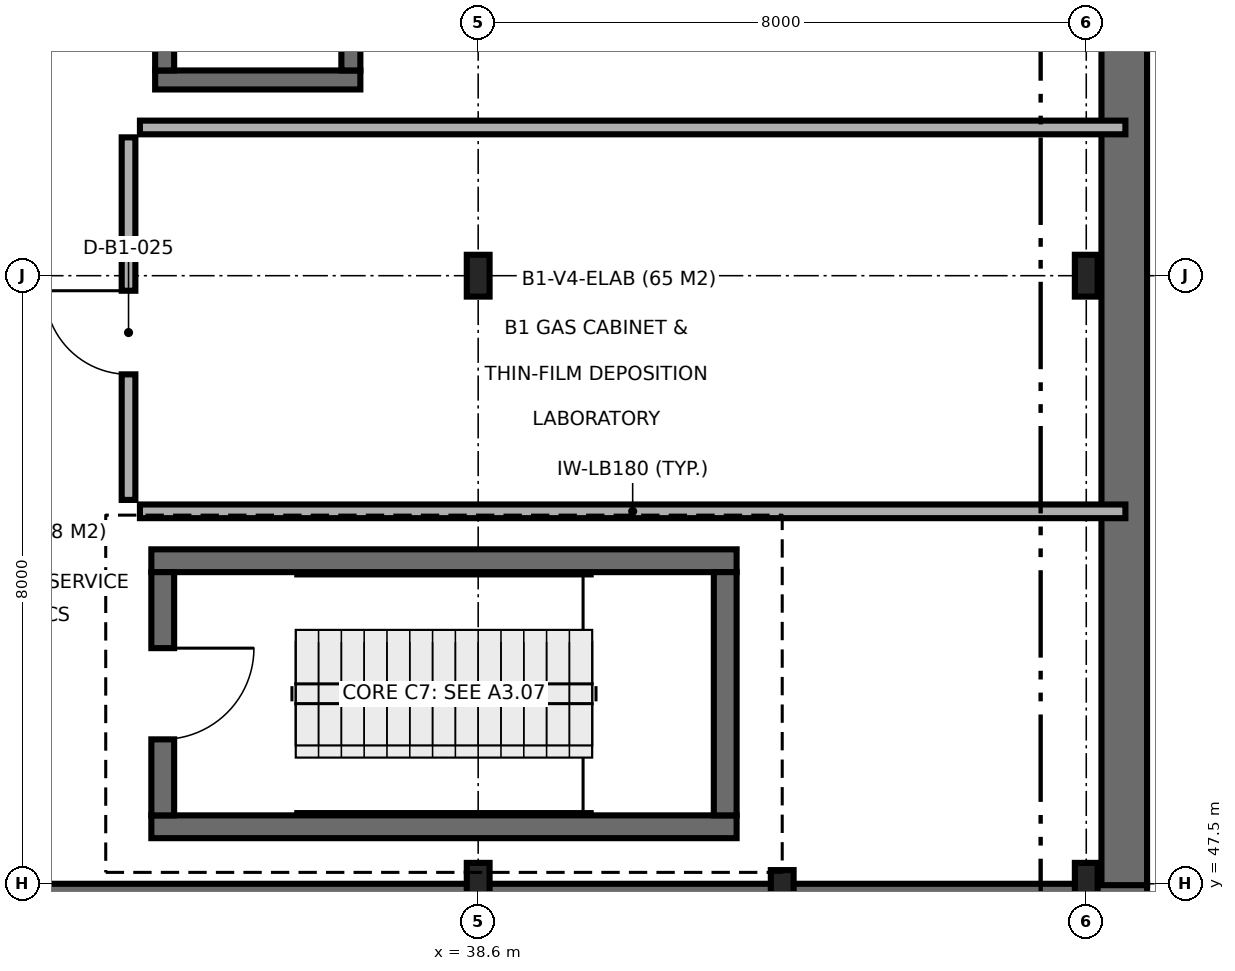
"""IFC4 building model, lengths in metres.
Left out: names, types, materials, properties, quantities, classifications, styles, units other than length and angle.
Written with IfcOpenShell. Run it as: python <this file> out.ifc"""

import sys

from ifc_helpers import new_model, si_unit, direction, frame, frame_2d, origin, origin_2d, place, context, subcontext, project, spatial, rectangle, i_section, extrude, element, fill, save


model = new_model("IFC4")
c1 = context("Model", 3, precision=1e-05, world=origin(), true_north=direction((0.0, 1.0)))
c2 = subcontext(c1, "Body", "Model", "MODEL_VIEW")
j1 = project(units=[si_unit("LENGTHUNIT", "METRE"), si_unit("PLANEANGLEUNIT", "RADIAN")], contexts=[c1])
p1 = place(None, origin())
s1 = spatial("IfcSite", under=j1, at=p1, CompositionType="ELEMENT")
p2 = place(p1, origin())
s2 = spatial("IfcBuilding", under=s1, at=p2, CompositionType="ELEMENT")
p3 = place(p2, frame((0.0, 0.0, -5.0)))
s3 = spatial("IfcBuildingStorey", under=s2, at=p3, CompositionType="ELEMENT", Elevation=-5.0)
for number, where, z_axis, x_axis in (
    (1, (38.6, 47.5, 0.0), (0.0, 0.0, 1.0), (1.0, 0.0, 0.0)),
    (2, (38.6, 55.5, 0.0), (0.0, 0.0, 1.0), (1.0, 0.0, 0.0)),
):
    element("IfcColumn", number, at=place(p3, frame(where, z_axis=z_axis, x_axis=x_axis)), inside=s3, PredefinedType="COLUMN", context=c2, shape_type="SweptSolid", body=[
        extrude(i_section(OverallWidth=0.3, OverallDepth=0.55, WebThickness=0.015, FlangeThickness=0.029, FilletRadius=0.027, at=origin_2d()), origin(), (0.0, 0.0, 1.0), 5.0),
    ])
p4 = place(p3, frame((42.6, 47.5, 0.0), z_axis=(0.0, 0.0, 1.0), x_axis=(1.0, 0.0, 0.0)))
e3 = element("IfcColumn", 3, at=p4, inside=s3, PredefinedType="COLUMN", context=c2, shape_type="SweptSolid", body=[
    extrude(i_section(OverallWidth=0.3, OverallDepth=0.36, WebThickness=0.012, FlangeThickness=0.022, FilletRadius=0.027, at=origin_2d()), origin(), (0.0, 0.0, 1.0), 5.0),
])
for number, where, z_axis, x_axis in (
    (4, (46.6, 47.5, 0.0), (0.0, 0.0, 1.0), (1.0, 0.0, 0.0)),
    (5, (46.6, 55.5, 0.0), (0.0, 0.0, 1.0), (1.0, 0.0, 0.0)),
):
    element("IfcColumn", number, at=place(p3, frame(where, z_axis=z_axis, x_axis=x_axis)), inside=s3, PredefinedType="COLUMN", context=c2, shape_type="SweptSolid", body=[
        extrude(i_section(OverallWidth=0.3, OverallDepth=0.55, WebThickness=0.015, FlangeThickness=0.029, FilletRadius=0.027, at=origin_2d()), origin(), (0.0, 0.0, 1.0), 5.0),
    ])
for number, where, z_axis, x_axis in (
    (6, (34.3, 48.25, 0.0), (0.0, 0.0, 1.0), (1.0, 0.0, 0.0)),
    (7, (42.0, 51.75, 0.0), (0.0, 0.0, 1.0), (-1.0, 0.0, 0.0)),
):
    element("IfcWall", number, at=place(p3, frame(where, z_axis=z_axis, x_axis=x_axis)), inside=s3, PredefinedType="SHEAR", context=c2, shape_type="SweptSolid", body=[
        extrude(rectangle(XDim=7.7, YDim=0.3, at=frame_2d((3.85, 0.0))), origin(), (0.0, 0.0, 1.0), 5.0),
    ])
p5 = place(p3, frame((34.45, 51.6, 0.0), z_axis=(0.0, 0.0, 1.0), x_axis=(0.0, -1.0, 0.0)))
e8 = element("IfcWall", 8, at=p5, inside=s3, PredefinedType="SHEAR", context=c2, shape_type="SweptSolid", body=[
    extrude(rectangle(XDim=3.2, YDim=0.3, at=frame_2d((1.6, 0.0))), origin(), (0.0, 0.0, 1.0), 5.0),
])
p6 = place(p5, frame((1.0, 0.0, 0.0)))
e9 = element("IfcOpeningElement", 9, at=p6, cuts=e8, PredefinedType="OPENING", context=c2, shape_type="SweptSolid", body=[
    extrude(rectangle(XDim=1.2, YDim=2.15, at=frame_2d((0.6, 1.075))), frame((0.0, 0.16, 0.0), z_axis=(0.0, -1.0, 0.0), x_axis=(1.0, 0.0, 0.0)), (0.0, 0.0, 1.0), 0.32),
])
p7 = place(p3, frame((41.85, 48.4, 0.0), z_axis=(0.0, 0.0, 1.0), x_axis=(0.0, 1.0, 0.0)))
e10 = element("IfcWall", 10, at=p7, inside=s3, PredefinedType="SHEAR", context=c2, shape_type="SweptSolid", body=[
    extrude(rectangle(XDim=3.2, YDim=0.3, at=frame_2d((1.6, 0.0))), origin(), (0.0, 0.0, 1.0), 5.0),
])
p8 = place(p3, frame((34.35, 58.075, 0.0), z_axis=(0.0, 0.0, 1.0), x_axis=(1.0, 0.0, 0.0)))
e11 = element("IfcWall", 11, at=p8, inside=s3, PredefinedType="SHEAR", context=c2, shape_type="SweptSolid", body=[
    extrude(rectangle(XDim=2.7, YDim=0.25, at=frame_2d((1.35, 0.0))), origin(), (0.0, 0.0, 1.0), 5.0),
])
p9 = place(p3, frame((34.475, 61.0, 0.0), z_axis=(0.0, 0.0, 1.0), x_axis=(0.0, -1.0, 0.0)))
e12 = element("IfcWall", 12, at=p9, inside=s3, PredefinedType="SHEAR", context=c2, shape_type="SweptSolid", body=[
    extrude(rectangle(XDim=2.8, YDim=0.25, at=frame_2d((1.4, 0.0))), origin(), (0.0, 0.0, 1.0), 5.0),
])
p10 = place(p9, frame((0.85, 0.0, 0.0)))
e13 = element("IfcOpeningElement", 13, at=p10, cuts=e12, PredefinedType="OPENING", context=c2, shape_type="SweptSolid", body=[
    extrude(rectangle(XDim=1.1, YDim=2.15, at=frame_2d((0.55, 1.075))), frame((0.0, 0.135, 0.0), z_axis=(0.0, -1.0, 0.0), x_axis=(1.0, 0.0, 0.0)), (0.0, 0.0, 1.0), 0.27),
])
p11 = place(p3, frame((36.925, 58.2, 0.0), z_axis=(0.0, 0.0, 1.0), x_axis=(0.0, 1.0, 0.0)))
e14 = element("IfcWall", 14, at=p11, inside=s3, PredefinedType="SHEAR", context=c2, shape_type="SweptSolid", body=[
    extrude(rectangle(XDim=2.8, YDim=0.25, at=frame_2d((1.4, 0.0))), origin(), (0.0, 0.0, 1.0), 5.0),
])
p12 = place(p3, frame((6.182, 47.2, 0.0), z_axis=(0.0, 0.0, 1.0), x_axis=(1.0, 0.0, 0.0)))
e15 = element("IfcWall", 15, at=p12, inside=s3, PredefinedType="SHEAR", context=c2, shape_type="SweptSolid", body=[
    extrude(rectangle(XDim=41.218, YDim=0.6, at=frame_2d((20.609, 0.0))), origin(), (0.0, 0.0, 1.0), 4.7),
])
p13 = place(p3, frame((47.1, 47.482, 0.0), z_axis=(0.0, 0.0, 1.0), x_axis=(0.0, 1.0, 0.0)))
e16 = element("IfcWall", 16, at=p13, inside=s3, PredefinedType="SHEAR", context=c2, shape_type="SweptSolid", body=[
    extrude(rectangle(XDim=27.018, YDim=0.6, at=frame_2d((13.509, 0.0))), origin(), (0.0, 0.0, 1.0), 4.7),
])
for number, where, z_axis, x_axis in (
    (17, (34.15, 52.4, 0.0), (0.0, 0.0, 1.0), (1.0, 0.0, 0.0)),
    (18, (34.15, 57.45, 0.0), (0.0, 0.0, 1.0), (1.0, 0.0, 0.0)),
):
    element("IfcWall", number, at=place(p3, frame(where, z_axis=z_axis, x_axis=x_axis)), inside=s3, PredefinedType="PARTITIONING", context=c2, shape_type="SweptSolid", body=[
        extrude(rectangle(XDim=12.965, YDim=0.18, at=frame_2d((6.482, 0.0))), origin(), (0.0, 0.0, 1.0), 4.7),
    ])
p14 = place(p3, frame((34.0, 52.55, 0.0), z_axis=(0.0, 0.0, 1.0), x_axis=(0.0, 1.0, 0.0)))
e19 = element("IfcWall", 19, at=p14, inside=s3, PredefinedType="PARTITIONING", context=c2, shape_type="SweptSolid", body=[
    extrude(rectangle(XDim=4.77, YDim=0.18, at=frame_2d((2.385, 0.0))), origin(), (0.0, 0.0, 1.0), 4.7),
])
p15 = place(p14, frame((1.652, 0.0, 0.0)))
e20 = element("IfcOpeningElement", 20, at=p15, cuts=e19, PredefinedType="OPENING", context=c2, shape_type="SweptSolid", body=[
    extrude(rectangle(XDim=1.1, YDim=2.15, at=frame_2d((0.55, 1.075))), frame((0.0, 0.1, 0.0), z_axis=(0.0, -1.0, 0.0), x_axis=(1.0, 0.0, 0.0)), (0.0, 0.0, 1.0), 0.2),
])
p16 = place(p6, origin())
e21 = element("IfcDoor", 21, at=p16, inside=s3, OperationType="SINGLE_SWING_LEFT", PredefinedType="DOOR", context=c2, shape_type="SweptSolid", body=[
    extrude(rectangle(XDim=1.2, YDim=2.15, at=frame_2d((0.6, 1.075))), frame((0.0, 0.025, 0.0), z_axis=(0.0, -1.0, 0.0), x_axis=(1.0, 0.0, 0.0)), (0.0, 0.0, 1.0), 0.05),
])
fill(e9, e21)
p17 = place(p15, origin())
e22 = element("IfcDoor", 22, at=p17, inside=s3, OperationType="SINGLE_SWING_RIGHT", PredefinedType="DOOR", context=c2, shape_type="SweptSolid", body=[
    extrude(rectangle(XDim=1.1, YDim=2.15, at=frame_2d((0.55, 1.075))), frame((0.0, 0.025, 0.0), z_axis=(0.0, -1.0, 0.0), x_axis=(1.0, 0.0, 0.0)), (0.0, 0.0, 1.0), 0.05),
])
fill(e20, e22)
save(model, sys.argv[1])
